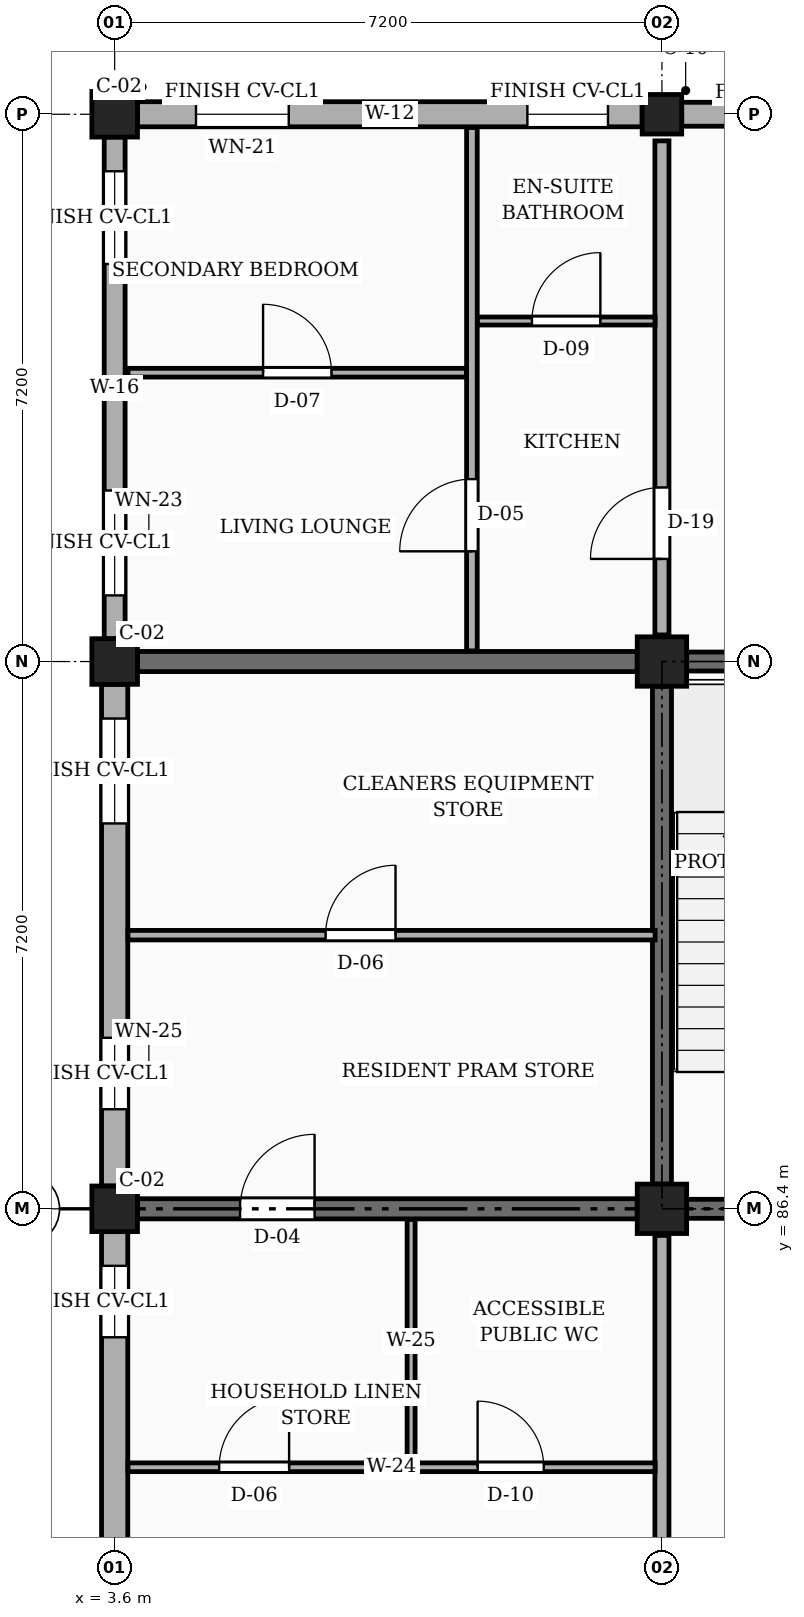
"""IFC4 building model, lengths in metres.
Left out: names, types, materials, properties, quantities, classifications, styles, units other than length and angle.
Written with IfcOpenShell. Run it as: python <this file> out.ifc"""

import sys

from ifc_helpers import new_model, si_unit, direction, frame, frame_2d, origin, origin_2d, place, context, subcontext, project, spatial, rectangle, circle, extrude, element, fill, save


model = new_model("IFC4")
c1 = context("Model", 3, precision=1e-05, world=origin(), true_north=direction((0.0, 1.0)))
c2 = subcontext(c1, "Body", "Model", "MODEL_VIEW")
j1 = project(units=[si_unit("LENGTHUNIT", "METRE"), si_unit("PLANEANGLEUNIT", "RADIAN")], contexts=[c1])
p1 = place(None, origin())
s1 = spatial("IfcSite", under=j1, at=p1, CompositionType="ELEMENT")
p2 = place(p1, origin())
s2 = spatial("IfcBuilding", under=s1, at=p2, CompositionType="ELEMENT")
p3 = place(p2, origin())
s3 = spatial("IfcBuildingStorey", under=s2, at=p3, CompositionType="ELEMENT", Elevation=0.0)
for number, where, z_axis, x_axis in (
    (1, (3.6, 86.4, 0.0), (0.0, 0.0, 1.0), (1.0, 0.0, 0.0)),
    (2, (3.6, 93.6, 0.0), (0.0, 0.0, 1.0), (1.0, 0.0, 0.0)),
    (3, (3.6, 100.8, 0.0), (0.0, 0.0, 1.0), (1.0, 0.0, 0.0)),
):
    element("IfcColumn", number, at=place(p3, frame(where, z_axis=z_axis, x_axis=x_axis)), inside=s3, PredefinedType="COLUMN", context=c2, shape_type="SweptSolid", body=[
        extrude(rectangle(XDim=0.6, YDim=0.6, at=origin_2d()), origin(), (0.0, 0.0, 1.0), 4.5),
    ])
for number, where, z_axis, x_axis in (
    (4, (10.8, 86.4, 0.0), (0.0, 0.0, 1.0), (1.0, 0.0, 0.0)),
    (5, (10.8, 93.6, 0.0), (0.0, 0.0, 1.0), (1.0, 0.0, 0.0)),
):
    element("IfcColumn", number, at=place(p3, frame(where, z_axis=z_axis, x_axis=x_axis)), inside=s3, PredefinedType="COLUMN", context=c2, shape_type="SweptSolid", body=[
        extrude(rectangle(XDim=0.65, YDim=0.65, at=origin_2d()), origin(), (0.0, 0.0, 1.0), 4.5),
    ])
p4 = place(p3, frame((10.8, 100.8, 0.0), z_axis=(0.0, 0.0, 1.0), x_axis=(1.0, 0.0, 0.0)))
e6 = element("IfcColumn", 6, at=p4, inside=s3, PredefinedType="COLUMN", context=c2, shape_type="SweptSolid", body=[
    extrude(circle(Radius=0.26, at=origin_2d()), origin(), (0.0, 0.0, 1.0), 4.5),
])
p5 = place(p3, frame((3.9, 86.4, 0.0), z_axis=(0.0, 0.0, 1.0), x_axis=(1.0, 0.0, 0.0)))
e7 = element("IfcWall", 7, at=p5, inside=s3, PredefinedType="SOLIDWALL", context=c2, shape_type="SweptSolid", body=[
    extrude(rectangle(XDim=6.575, YDim=0.265, at=frame_2d((3.288, 0.0))), origin(), (0.0, 0.0, 1.0), 3.56),
])
p6 = place(p5, frame((1.35, 0.0, 0.0)))
e8 = element("IfcOpeningElement", 8, at=p6, cuts=e7, PredefinedType="OPENING", context=c2, shape_type="SweptSolid", body=[
    extrude(rectangle(XDim=0.98, YDim=2.12, at=frame_2d((0.49, 1.06))), frame((0.0, 0.143, 0.0), z_axis=(0.0, -1.0, 0.0), x_axis=(1.0, 0.0, 0.0)), (0.0, 0.0, 1.0), 0.285),
])
p7 = place(p3, frame((3.9, 93.6, 0.0), z_axis=(0.0, 0.0, 1.0), x_axis=(1.0, 0.0, 0.0)))
e9 = element("IfcWall", 9, at=p7, inside=s3, PredefinedType="SOLIDWALL", context=c2, shape_type="SweptSolid", body=[
    extrude(rectangle(XDim=6.575, YDim=0.265, at=frame_2d((3.288, 0.0))), origin(), (0.0, 0.0, 1.0), 3.56),
])
p8 = place(p3, frame((17.7, 100.8, 0.0), z_axis=(0.0, 0.0, 1.0), x_axis=(-1.0, 0.0, 0.0)))
e10 = element("IfcWall", 10, at=p8, inside=s3, PredefinedType="SOLIDWALL", context=c2, shape_type="SweptSolid", body=[
    extrude(rectangle(XDim=6.64, YDim=0.315, at=frame_2d((3.32, 0.0))), origin(), (0.0, 0.0, 1.0), 3.83),
])
p9 = place(p8, frame((0.45, 0.0, 0.78)))
e11 = element("IfcOpeningElement", 11, at=p9, cuts=e10, PredefinedType="OPENING", context=c2, shape_type="SweptSolid", body=[
    extrude(rectangle(XDim=0.9, YDim=1.36, at=frame_2d((0.45, 0.68))), frame((0.0, 0.167, 0.0), z_axis=(0.0, -1.0, 0.0), x_axis=(1.0, 0.0, 0.0)), (0.0, 0.0, 1.0), 0.335),
])
p10 = place(p8, frame((4.65, 0.0, 0.78)))
e12 = element("IfcOpeningElement", 12, at=p10, cuts=e10, PredefinedType="OPENING", context=c2, shape_type="SweptSolid", body=[
    extrude(rectangle(XDim=1.06, YDim=1.36, at=frame_2d((0.53, 0.68))), frame((0.0, 0.167, 0.0), z_axis=(0.0, -1.0, 0.0), x_axis=(1.0, 0.0, 0.0)), (0.0, 0.0, 1.0), 0.335),
])
p11 = place(p3, frame((10.54, 100.8, 0.0), z_axis=(0.0, 0.0, 1.0), x_axis=(-1.0, 0.0, 0.0)))
e13 = element("IfcWall", 13, at=p11, inside=s3, PredefinedType="SOLIDWALL", context=c2, shape_type="SweptSolid", body=[
    extrude(rectangle(XDim=6.64, YDim=0.33, at=frame_2d((3.32, 0.0))), origin(), (0.0, 0.0, 1.0), 3.83),
])
p12 = place(p11, frame((0.45, 0.0, 0.78)))
e14 = element("IfcOpeningElement", 14, at=p12, cuts=e13, PredefinedType="OPENING", context=c2, shape_type="SweptSolid", body=[
    extrude(rectangle(XDim=1.06, YDim=1.36, at=frame_2d((0.53, 0.68))), frame((0.0, 0.175, 0.0), z_axis=(0.0, -1.0, 0.0), x_axis=(1.0, 0.0, 0.0)), (0.0, 0.0, 1.0), 0.35),
])
p13 = place(p11, frame((4.65, 0.0, 0.78)))
e15 = element("IfcOpeningElement", 15, at=p13, cuts=e13, PredefinedType="OPENING", context=c2, shape_type="SweptSolid", body=[
    extrude(rectangle(XDim=1.22, YDim=1.36, at=frame_2d((0.61, 0.68))), frame((0.0, 0.175, 0.0), z_axis=(0.0, -1.0, 0.0), x_axis=(1.0, 0.0, 0.0)), (0.0, 0.0, 1.0), 0.35),
])
p14 = place(p3, frame((3.6, 100.5, 0.0), z_axis=(0.0, 0.0, 1.0), x_axis=(0.0, -1.0, 0.0)))
e16 = element("IfcWall", 16, at=p14, inside=s3, PredefinedType="SOLIDWALL", context=c2, shape_type="SweptSolid", body=[
    extrude(rectangle(XDim=6.6, YDim=0.275, at=frame_2d((3.3, 0.0))), origin(), (0.0, 0.0, 1.0), 3.83),
])
p15 = place(p14, frame((0.45, 0.0, 0.78)))
e17 = element("IfcOpeningElement", 17, at=p15, cuts=e16, PredefinedType="OPENING", context=c2, shape_type="SweptSolid", body=[
    extrude(rectangle(XDim=1.22, YDim=1.36, at=frame_2d((0.61, 0.68))), frame((0.0, 0.147, 0.0), z_axis=(0.0, -1.0, 0.0), x_axis=(1.0, 0.0, 0.0)), (0.0, 0.0, 1.0), 0.295),
])
p16 = place(p14, frame((4.65, 0.0, 0.78)))
e18 = element("IfcOpeningElement", 18, at=p16, cuts=e16, PredefinedType="OPENING", context=c2, shape_type="SweptSolid", body=[
    extrude(rectangle(XDim=1.38, YDim=1.36, at=frame_2d((0.69, 0.68))), frame((0.0, 0.147, 0.0), z_axis=(0.0, -1.0, 0.0), x_axis=(1.0, 0.0, 0.0)), (0.0, 0.0, 1.0), 0.295),
])
p17 = place(p3, frame((3.6, 93.3, 0.0), z_axis=(0.0, 0.0, 1.0), x_axis=(0.0, -1.0, 0.0)))
e19 = element("IfcWall", 19, at=p17, inside=s3, PredefinedType="SOLIDWALL", context=c2, shape_type="SweptSolid", body=[
    extrude(rectangle(XDim=6.6, YDim=0.345, at=frame_2d((3.3, 0.0))), origin(), (0.0, 0.0, 1.0), 3.83),
])
p18 = place(p17, frame((0.45, 0.0, 0.78)))
e20 = element("IfcOpeningElement", 20, at=p18, cuts=e19, PredefinedType="OPENING", context=c2, shape_type="SweptSolid", body=[
    extrude(rectangle(XDim=1.38, YDim=1.36, at=frame_2d((0.69, 0.68))), frame((0.0, 0.183, 0.0), z_axis=(0.0, -1.0, 0.0), x_axis=(1.0, 0.0, 0.0)), (0.0, 0.0, 1.0), 0.365),
])
p19 = place(p17, frame((4.65, 0.0, 0.78)))
e21 = element("IfcOpeningElement", 21, at=p19, cuts=e19, PredefinedType="OPENING", context=c2, shape_type="SweptSolid", body=[
    extrude(rectangle(XDim=0.94, YDim=1.44, at=frame_2d((0.47, 0.72))), frame((0.0, 0.183, 0.0), z_axis=(0.0, -1.0, 0.0), x_axis=(1.0, 0.0, 0.0)), (0.0, 0.0, 1.0), 0.365),
])
p20 = place(p3, frame((3.6, 86.1, 0.0), z_axis=(0.0, 0.0, 1.0), x_axis=(0.0, -1.0, 0.0)))
e22 = element("IfcWall", 22, at=p20, inside=s3, PredefinedType="SOLIDWALL", context=c2, shape_type="SweptSolid", body=[
    extrude(rectangle(XDim=6.64, YDim=0.345, at=frame_2d((3.32, 0.0))), origin(), (0.0, 0.0, 1.0), 3.83),
])
p21 = place(p20, frame((0.45, 0.0, 0.78)))
e23 = element("IfcOpeningElement", 23, at=p21, cuts=e22, PredefinedType="OPENING", context=c2, shape_type="SweptSolid", body=[
    extrude(rectangle(XDim=0.94, YDim=1.44, at=frame_2d((0.47, 0.72))), frame((0.0, 0.183, 0.0), z_axis=(0.0, -1.0, 0.0), x_axis=(1.0, 0.0, 0.0)), (0.0, 0.0, 1.0), 0.365),
])
p22 = place(p20, frame((4.65, 0.0, 0.78)))
e24 = element("IfcOpeningElement", 24, at=p22, cuts=e22, PredefinedType="OPENING", context=c2, shape_type="SweptSolid", body=[
    extrude(rectangle(XDim=1.15, YDim=1.44, at=frame_2d((0.575, 0.72))), frame((0.0, 0.183, 0.0), z_axis=(0.0, -1.0, 0.0), x_axis=(1.0, 0.0, 0.0)), (0.0, 0.0, 1.0), 0.365),
])
p23 = place(p3, frame((10.8, 86.725, 0.0), z_axis=(0.0, 0.0, 1.0), x_axis=(0.0, 1.0, 0.0)))
e25 = element("IfcWall", 25, at=p23, inside=s3, PredefinedType="SHEAR", context=c2, shape_type="SweptSolid", body=[
    extrude(rectangle(XDim=6.55, YDim=0.25, at=frame_2d((3.275, 0.0))), origin(), (0.0, 0.0, 1.0), 4.26),
])
p24 = place(p3, frame((11.125, 93.6, 0.0), z_axis=(0.0, 0.0, 1.0), x_axis=(1.0, 0.0, 0.0)))
e26 = element("IfcWall", 26, at=p24, inside=s3, PredefinedType="SHEAR", context=c2, shape_type="SweptSolid", body=[
    extrude(rectangle(XDim=6.55, YDim=0.25, at=frame_2d((3.275, 0.0))), origin(), (0.0, 0.0, 1.0), 4.26),
])
p25 = place(p3, frame((11.125, 86.4, 0.0), z_axis=(0.0, 0.0, 1.0), x_axis=(1.0, 0.0, 0.0)))
e27 = element("IfcWall", 27, at=p25, inside=s3, PredefinedType="SHEAR", context=c2, shape_type="SweptSolid", body=[
    extrude(rectangle(XDim=6.55, YDim=0.25, at=frame_2d((3.275, 0.0))), origin(), (0.0, 0.0, 1.0), 4.26),
])
p26 = place(p25, frame((4.425, 0.0, 0.0)))
e28 = element("IfcOpeningElement", 28, at=p26, cuts=e27, PredefinedType="OPENING", context=c2, shape_type="SweptSolid", body=[
    extrude(rectangle(XDim=1.1, YDim=2.15, at=frame_2d((0.55, 1.075))), frame((0.0, 0.135, 0.0), z_axis=(0.0, -1.0, 0.0), x_axis=(1.0, 0.0, 0.0)), (0.0, 0.0, 1.0), 0.27),
])
p27 = place(p3, frame((10.8, 79.55, 0.0), z_axis=(0.0, 0.0, 1.0), x_axis=(0.0, 1.0, 0.0)))
e29 = element("IfcWall", 29, at=p27, inside=s3, PredefinedType="PARTITIONING", context=c2, shape_type="SweptSolid", body=[
    extrude(rectangle(XDim=6.5, YDim=0.185, at=frame_2d((3.25, 0.0))), origin(), (0.0, 0.0, 1.0), 3.51),
])
p28 = place(p27, frame((1.1, 0.0, 0.0)))
e30 = element("IfcOpeningElement", 30, at=p28, cuts=e29, PredefinedType="OPENING", context=c2, shape_type="SweptSolid", body=[
    extrude(rectangle(XDim=1.0, YDim=2.15, at=frame_2d((0.5, 1.075))), frame((0.0, 0.103, 0.0), z_axis=(0.0, -1.0, 0.0), x_axis=(1.0, 0.0, 0.0)), (0.0, 0.0, 1.0), 0.205),
])
p29 = place(p3, frame((10.8, 93.95, 0.0), z_axis=(0.0, 0.0, 1.0), x_axis=(0.0, 1.0, 0.0)))
e31 = element("IfcWall", 31, at=p29, inside=s3, PredefinedType="PARTITIONING", context=c2, shape_type="SweptSolid", body=[
    extrude(rectangle(XDim=6.5, YDim=0.185, at=frame_2d((3.25, 0.0))), origin(), (0.0, 0.0, 1.0), 3.51),
])
p30 = place(p29, frame((1.0, 0.0, 0.0)))
e32 = element("IfcOpeningElement", 32, at=p30, cuts=e31, PredefinedType="OPENING", context=c2, shape_type="SweptSolid", body=[
    extrude(rectangle(XDim=0.94, YDim=2.12, at=frame_2d((0.47, 1.06))), frame((0.0, 0.103, 0.0), z_axis=(0.0, -1.0, 0.0), x_axis=(1.0, 0.0, 0.0)), (0.0, 0.0, 1.0), 0.205),
])
p31 = place(p3, frame((3.775, 83.0, 0.0), z_axis=(0.0, 0.0, 1.0), x_axis=(1.0, 0.0, 0.0)))
e33 = element("IfcWall", 33, at=p31, inside=s3, PredefinedType="PARTITIONING", context=c2, shape_type="SweptSolid", body=[
    extrude(rectangle(XDim=6.935, YDim=0.115, at=frame_2d((3.468, 0.0))), origin(), (0.0, 0.0, 1.0), 3.695),
])
p32 = place(p31, frame((4.6, 0.0, 0.0)))
e34 = element("IfcOpeningElement", 34, at=p32, cuts=e33, PredefinedType="OPENING", context=c2, shape_type="SweptSolid", body=[
    extrude(rectangle(XDim=0.87, YDim=2.05, at=frame_2d((0.435, 1.025))), frame((0.0, 0.067, 0.0), z_axis=(0.0, -1.0, 0.0), x_axis=(1.0, 0.0, 0.0)), (0.0, 0.0, 1.0), 0.135),
])
p33 = place(p31, frame((1.2, 0.0, 0.0)))
e35 = element("IfcOpeningElement", 35, at=p33, cuts=e33, PredefinedType="OPENING", context=c2, shape_type="SweptSolid", body=[
    extrude(rectangle(XDim=0.92, YDim=2.1, at=frame_2d((0.46, 1.05))), frame((0.0, 0.067, 0.0), z_axis=(0.0, -1.0, 0.0), x_axis=(1.0, 0.0, 0.0)), (0.0, 0.0, 1.0), 0.135),
])
p34 = place(p3, frame((7.5, 83.07, 0.0), z_axis=(0.0, 0.0, 1.0), x_axis=(0.0, 1.0, 0.0)))
e36 = element("IfcWall", 36, at=p34, inside=s3, PredefinedType="PARTITIONING", context=c2, shape_type="SweptSolid", body=[
    extrude(rectangle(XDim=3.19, YDim=0.105, at=frame_2d((1.595, 0.0))), origin(), (0.0, 0.0, 1.0), 3.695),
])
p35 = place(p3, frame((3.775, 90.0, 0.0), z_axis=(0.0, 0.0, 1.0), x_axis=(1.0, 0.0, 0.0)))
e37 = element("IfcWall", 37, at=p35, inside=s3, PredefinedType="PARTITIONING", context=c2, shape_type="SweptSolid", body=[
    extrude(rectangle(XDim=6.935, YDim=0.125, at=frame_2d((3.468, 0.0))), origin(), (0.0, 0.0, 1.0), 3.695),
])
p36 = place(p35, frame((2.6, 0.0, 0.0)))
e38 = element("IfcOpeningElement", 38, at=p36, cuts=e37, PredefinedType="OPENING", context=c2, shape_type="SweptSolid", body=[
    extrude(rectangle(XDim=0.92, YDim=2.1, at=frame_2d((0.46, 1.05))), frame((0.0, 0.073, 0.0), z_axis=(0.0, -1.0, 0.0), x_axis=(1.0, 0.0, 0.0)), (0.0, 0.0, 1.0), 0.145),
])
p37 = place(p3, frame((3.775, 97.4, 0.0), z_axis=(0.0, 0.0, 1.0), x_axis=(1.0, 0.0, 0.0)))
e39 = element("IfcWall", 39, at=p37, inside=s3, PredefinedType="PARTITIONING", context=c2, shape_type="SweptSolid", body=[
    extrude(rectangle(XDim=4.455, YDim=0.115, at=frame_2d((2.228, 0.0))), origin(), (0.0, 0.0, 1.0), 3.695),
])
p38 = place(p37, frame((1.778, 0.0, 0.0)))
e40 = element("IfcOpeningElement", 40, at=p38, cuts=e39, PredefinedType="OPENING", context=c2, shape_type="SweptSolid", body=[
    extrude(rectangle(XDim=0.9, YDim=2.1, at=frame_2d((0.45, 1.05))), frame((0.0, 0.067, 0.0), z_axis=(0.0, -1.0, 0.0), x_axis=(1.0, 0.0, 0.0)), (0.0, 0.0, 1.0), 0.135),
])
p39 = place(p3, frame((8.37, 98.08, 0.0), z_axis=(0.0, 0.0, 1.0), x_axis=(1.0, 0.0, 0.0)))
e41 = element("IfcWall", 41, at=p39, inside=s3, PredefinedType="PARTITIONING", context=c2, shape_type="SweptSolid", body=[
    extrude(rectangle(XDim=2.34, YDim=0.105, at=frame_2d((1.17, 0.0))), origin(), (0.0, 0.0, 1.0), 3.695),
])
p40 = place(p39, frame((0.72, 0.0, 0.0)))
e42 = element("IfcOpeningElement", 42, at=p40, cuts=e41, PredefinedType="OPENING", context=c2, shape_type="SweptSolid", body=[
    extrude(rectangle(XDim=0.9, YDim=2.05, at=frame_2d((0.45, 1.025))), frame((0.0, 0.062, 0.0), z_axis=(0.0, -1.0, 0.0), x_axis=(1.0, 0.0, 0.0)), (0.0, 0.0, 1.0), 0.125),
])
p41 = place(p3, frame((8.3, 93.74, 0.0), z_axis=(0.0, 0.0, 1.0), x_axis=(0.0, 1.0, 0.0)))
e43 = element("IfcWall", 43, at=p41, inside=s3, PredefinedType="PARTITIONING", context=c2, shape_type="SweptSolid", body=[
    extrude(rectangle(XDim=6.885, YDim=0.14, at=frame_2d((3.442, 0.0))), origin(), (0.0, 0.0, 1.0), 3.695),
])
p42 = place(p41, frame((1.31, 0.0, 0.0)))
e44 = element("IfcOpeningElement", 44, at=p42, cuts=e43, PredefinedType="OPENING", context=c2, shape_type="SweptSolid", body=[
    extrude(rectangle(XDim=0.95, YDim=2.1, at=frame_2d((0.475, 1.05))), frame((0.0, 0.08, 0.0), z_axis=(0.0, -1.0, 0.0), x_axis=(1.0, 0.0, 0.0)), (0.0, 0.0, 1.0), 0.16),
])
p43 = place(p12, origin())
e45 = element("IfcWindow", 45, at=p43, inside=s3, PartitioningType="SINGLE_PANEL", PredefinedType="WINDOW", context=c2, shape_type="SweptSolid", body=[
    extrude(rectangle(XDim=1.06, YDim=1.36, at=frame_2d((0.53, 0.68))), frame((0.0, 0.03, 0.0), z_axis=(0.0, -1.0, 0.0), x_axis=(1.0, 0.0, 0.0)), (0.0, 0.0, 1.0), 0.06),
])
fill(e14, e45)
p44 = place(p13, origin())
e46 = element("IfcWindow", 46, at=p44, inside=s3, PartitioningType="SINGLE_PANEL", PredefinedType="WINDOW", context=c2, shape_type="SweptSolid", body=[
    extrude(rectangle(XDim=1.22, YDim=1.36, at=frame_2d((0.61, 0.68))), frame((0.0, 0.03, 0.0), z_axis=(0.0, -1.0, 0.0), x_axis=(1.0, 0.0, 0.0)), (0.0, 0.0, 1.0), 0.06),
])
fill(e15, e46)
p45 = place(p15, origin())
e47 = element("IfcWindow", 47, at=p45, inside=s3, PartitioningType="SINGLE_PANEL", PredefinedType="WINDOW", context=c2, shape_type="SweptSolid", body=[
    extrude(rectangle(XDim=1.22, YDim=1.36, at=frame_2d((0.61, 0.68))), frame((0.0, 0.03, 0.0), z_axis=(0.0, -1.0, 0.0), x_axis=(1.0, 0.0, 0.0)), (0.0, 0.0, 1.0), 0.06),
])
fill(e17, e47)
p46 = place(p16, origin())
e48 = element("IfcWindow", 48, at=p46, inside=s3, PartitioningType="SINGLE_PANEL", PredefinedType="WINDOW", context=c2, shape_type="SweptSolid", body=[
    extrude(rectangle(XDim=1.38, YDim=1.36, at=frame_2d((0.69, 0.68))), frame((0.0, 0.03, 0.0), z_axis=(0.0, -1.0, 0.0), x_axis=(1.0, 0.0, 0.0)), (0.0, 0.0, 1.0), 0.06),
])
fill(e18, e48)
p47 = place(p18, origin())
e49 = element("IfcWindow", 49, at=p47, inside=s3, PartitioningType="SINGLE_PANEL", PredefinedType="WINDOW", context=c2, shape_type="SweptSolid", body=[
    extrude(rectangle(XDim=1.38, YDim=1.36, at=frame_2d((0.69, 0.68))), frame((0.0, 0.03, 0.0), z_axis=(0.0, -1.0, 0.0), x_axis=(1.0, 0.0, 0.0)), (0.0, 0.0, 1.0), 0.06),
])
fill(e20, e49)
p48 = place(p19, origin())
e50 = element("IfcWindow", 50, at=p48, inside=s3, PartitioningType="SINGLE_PANEL", PredefinedType="WINDOW", context=c2, shape_type="SweptSolid", body=[
    extrude(rectangle(XDim=0.94, YDim=1.44, at=frame_2d((0.47, 0.72))), frame((0.0, 0.03, 0.0), z_axis=(0.0, -1.0, 0.0), x_axis=(1.0, 0.0, 0.0)), (0.0, 0.0, 1.0), 0.06),
])
fill(e21, e50)
p49 = place(p21, origin())
e51 = element("IfcWindow", 51, at=p49, inside=s3, PartitioningType="SINGLE_PANEL", PredefinedType="WINDOW", context=c2, shape_type="SweptSolid", body=[
    extrude(rectangle(XDim=0.94, YDim=1.44, at=frame_2d((0.47, 0.72))), frame((0.0, 0.03, 0.0), z_axis=(0.0, -1.0, 0.0), x_axis=(1.0, 0.0, 0.0)), (0.0, 0.0, 1.0), 0.06),
])
fill(e23, e51)
p50 = place(p30, origin())
e52 = element("IfcDoor", 52, at=p50, inside=s3, OperationType="SINGLE_SWING_LEFT", PredefinedType="DOOR", context=c2, shape_type="SweptSolid", body=[
    extrude(rectangle(XDim=0.94, YDim=2.12, at=frame_2d((0.47, 1.06))), frame((0.0, 0.025, 0.0), z_axis=(0.0, -1.0, 0.0), x_axis=(1.0, 0.0, 0.0)), (0.0, 0.0, 1.0), 0.05),
])
fill(e32, e52)
p51 = place(p32, origin())
e53 = element("IfcDoor", 53, at=p51, inside=s3, OperationType="SINGLE_SWING_LEFT", PredefinedType="DOOR", context=c2, shape_type="SweptSolid", body=[
    extrude(rectangle(XDim=0.87, YDim=2.05, at=frame_2d((0.435, 1.025))), frame((0.0, 0.025, 0.0), z_axis=(0.0, -1.0, 0.0), x_axis=(1.0, 0.0, 0.0)), (0.0, 0.0, 1.0), 0.05),
])
fill(e34, e53)
p52 = place(p33, origin())
e54 = element("IfcDoor", 54, at=p52, inside=s3, OperationType="SINGLE_SWING_RIGHT", PredefinedType="DOOR", context=c2, shape_type="SweptSolid", body=[
    extrude(rectangle(XDim=0.92, YDim=2.1, at=frame_2d((0.46, 1.05))), frame((0.0, 0.025, 0.0), z_axis=(0.0, -1.0, 0.0), x_axis=(1.0, 0.0, 0.0)), (0.0, 0.0, 1.0), 0.05),
])
fill(e35, e54)
p53 = place(p36, origin())
e55 = element("IfcDoor", 55, at=p53, inside=s3, OperationType="SINGLE_SWING_RIGHT", PredefinedType="DOOR", context=c2, shape_type="SweptSolid", body=[
    extrude(rectangle(XDim=0.92, YDim=2.1, at=frame_2d((0.46, 1.05))), frame((0.0, 0.025, 0.0), z_axis=(0.0, -1.0, 0.0), x_axis=(1.0, 0.0, 0.0)), (0.0, 0.0, 1.0), 0.05),
])
fill(e38, e55)
p54 = place(p38, origin())
e56 = element("IfcDoor", 56, at=p54, inside=s3, OperationType="SINGLE_SWING_LEFT", PredefinedType="DOOR", context=c2, shape_type="SweptSolid", body=[
    extrude(rectangle(XDim=0.9, YDim=2.1, at=frame_2d((0.45, 1.05))), frame((0.0, 0.025, 0.0), z_axis=(0.0, -1.0, 0.0), x_axis=(1.0, 0.0, 0.0)), (0.0, 0.0, 1.0), 0.05),
])
fill(e40, e56)
p55 = place(p40, origin())
e57 = element("IfcDoor", 57, at=p55, inside=s3, OperationType="SINGLE_SWING_RIGHT", PredefinedType="DOOR", context=c2, shape_type="SweptSolid", body=[
    extrude(rectangle(XDim=0.9, YDim=2.05, at=frame_2d((0.45, 1.025))), frame((0.0, 0.025, 0.0), z_axis=(0.0, -1.0, 0.0), x_axis=(1.0, 0.0, 0.0)), (0.0, 0.0, 1.0), 0.05),
])
fill(e42, e57)
p56 = place(p42, origin())
e58 = element("IfcDoor", 58, at=p56, inside=s3, OperationType="SINGLE_SWING_LEFT", PredefinedType="DOOR", context=c2, shape_type="SweptSolid", body=[
    extrude(rectangle(XDim=0.95, YDim=2.1, at=frame_2d((0.475, 1.05))), frame((0.0, 0.025, 0.0), z_axis=(0.0, -1.0, 0.0), x_axis=(1.0, 0.0, 0.0)), (0.0, 0.0, 1.0), 0.05),
])
fill(e44, e58)
p57 = place(p6, origin())
e59 = element("IfcDoor", 59, at=p57, inside=s3, OperationType="SINGLE_SWING_RIGHT", PredefinedType="DOOR", context=c2, shape_type="SweptSolid", body=[
    extrude(rectangle(XDim=0.98, YDim=2.12, at=frame_2d((0.49, 1.06))), frame((0.0, 0.025, 0.0), z_axis=(0.0, -1.0, 0.0), x_axis=(1.0, 0.0, 0.0)), (0.0, 0.0, 1.0), 0.05),
])
fill(e8, e59)
save(model, sys.argv[1])
